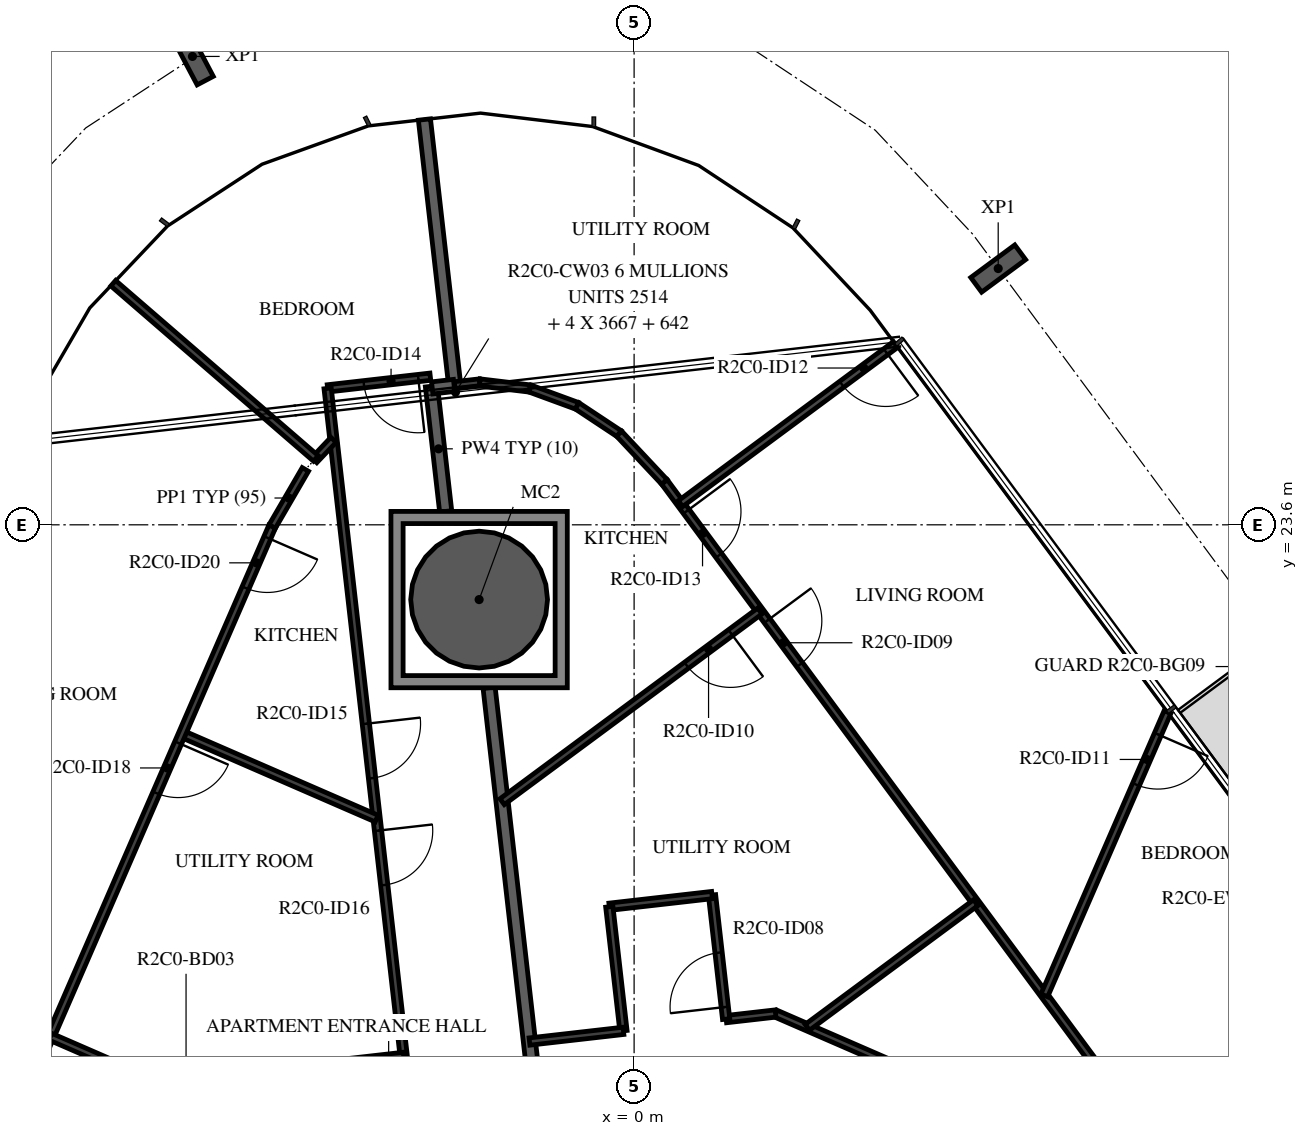
"""IFC4 building model, lengths in metres.
Left out: names, types, materials, properties, quantities, classifications, styles, units other than length and angle.
Written with IfcOpenShell. Run it as: python <this file> out.ifc"""

import sys

from ifc_helpers import new_model, si_unit, direction, frame, frame_2d, origin, origin_2d, place, context, subcontext, project, spatial, polyline, rectangle, hollow_circle, i_section, outline, extrude, element, fill, save


model = new_model("IFC4")
c1 = context("Model", 3, precision=1e-05, world=origin(), true_north=direction((0.0, 1.0)))
c2 = subcontext(c1, "Body", "Model", "MODEL_VIEW")
j1 = project(units=[si_unit("LENGTHUNIT", "METRE"), si_unit("PLANEANGLEUNIT", "RADIAN")], contexts=[c1])
p1 = place(None, origin())
s1 = spatial("IfcSite", under=j1, at=p1, CompositionType="ELEMENT")
p2 = place(p1, origin())
s2 = spatial("IfcBuilding", under=s1, at=p2, CompositionType="ELEMENT")
p3 = place(p2, frame((0.0, 0.0, 97.7)))
s3 = spatial("IfcBuildingStorey", under=s2, at=p3, CompositionType="ELEMENT", Elevation=97.7)
p4 = place(p3, frame((-2.549, 22.37, -0.38), z_axis=(0.0, 0.0, 1.0), x_axis=(1.0, 0.0, 0.0)))
e1 = element("IfcColumn", 1, at=p4, inside=s3, PredefinedType="COLUMN", context=c2, shape_type="SweptSolid", body=[
    extrude(hollow_circle(Radius=1.125, WallThickness=0.055, at=origin_2d()), origin(), (0.0, 0.0, 1.0), 3.5),
])
for number, where, z_axis, x_axis in (
    (2, (5.988, 27.814, -0.38), (0.0, 0.0, 1.0), (0.595, -0.804, 0.0)),
    (3, (-7.263, 31.302, -0.38), (0.0, 0.0, 1.0), (0.884, 0.467, 0.0)),
):
    element("IfcColumn", number, at=place(p3, frame(where, z_axis=z_axis, x_axis=x_axis)), inside=s3, PredefinedType="COLUMN", context=c2, shape_type="SweptSolid", body=[
        extrude(i_section(OverallWidth=0.3, OverallDepth=0.9, WebThickness=0.019, FlangeThickness=0.035, FilletRadius=0.03, at=origin_2d()), origin(), (0.0, 0.0, 1.0), 3.5),
    ])
p5 = place(p3, frame((-2.385, 20.92, 0.0), z_axis=(0.0, 0.0, 1.0), x_axis=(0.113177776247, -0.993574753586, 0.0)))
e4 = element("IfcWall", 4, at=p5, inside=s3, PredefinedType="STANDARD", context=c2, shape_type="SweptSolid", body=[
    extrude(rectangle(XDim=7.356, YDim=0.2, at=frame_2d((3.678, 0.0))), origin(), (0.0, 0.0, 1.0), 3.12),
])
p6 = place(p3, frame((-3.448, 30.265, 0.0), z_axis=(0.0, 0.0, 1.0), x_axis=(0.113189797494, -0.993573384176, 0.0)))
e5 = element("IfcWall", 5, at=p6, inside=s3, PredefinedType="STANDARD", context=c2, shape_type="SweptSolid", body=[
    extrude(rectangle(XDim=4.4, YDim=0.2, at=frame_2d((2.2, 0.0))), origin(), (0.0, 0.0, 1.0), 3.12),
])
p7 = place(p3, frame((-3.333, 25.879, 0.0), z_axis=(0.0, 0.0, 1.0), x_axis=(0.113250782095, -0.993566434797, 0.0)))
e6 = element("IfcWall", 6, at=p7, inside=s3, PredefinedType="STANDARD", context=c2, shape_type="SweptSolid", body=[
    extrude(rectangle(XDim=2.072, YDim=0.2, at=frame_2d((1.036, 0.0))), origin(), (0.0, 0.0, 1.0), 3.12),
])
p8 = place(p3, frame((-2.96, 25.892, 0.0), z_axis=(0.0, 0.0, 1.0), x_axis=(-0.993567388358, -0.113242416041, 0.0)))
e7 = element("IfcWall", 7, at=p8, inside=s3, PredefinedType="STANDARD", context=c2, shape_type="SweptSolid", body=[
    extrude(rectangle(XDim=0.362, YDim=0.2, at=frame_2d((0.181, 0.0))), origin(), (0.0, 0.0, 1.0), 3.12),
])
p9 = place(p3, frame((9.796, 12.315, 0.0), z_axis=(0.0, 0.0, 1.0), x_axis=(-0.917059572812, 0.398750222463, 0.0)))
e8 = element("IfcWall", 8, at=p9, inside=s3, PredefinedType="PARTITIONING", context=c2, shape_type="SweptSolid", body=[
    extrude(rectangle(XDim=8.146, YDim=0.12, at=frame_2d((4.073, 0.0))), origin(), (0.0, 0.0, 1.0), 3.12),
])
p10 = place(p9, frame((2.185, 0.0, 0.0)))
e9 = element("IfcOpeningElement", 9, at=p10, cuts=e8, PredefinedType="OPENING", context=c2, shape_type="SweptSolid", body=[
    extrude(rectangle(XDim=0.8, YDim=2.1, at=frame_2d((0.4, 1.05))), frame((0.0, 0.07, 0.0), z_axis=(0.0, -1.0, 0.0), x_axis=(1.0, 0.0, 0.0)), (0.0, 0.0, 1.0), 0.14),
])
p11 = place(p3, frame((2.326, 15.563, 0.0), z_axis=(0.0, 0.0, 1.0), x_axis=(-0.993570169982, -0.113218007944, 0.0)))
e10 = element("IfcWall", 10, at=p11, inside=s3, PredefinedType="PARTITIONING", context=c2, shape_type="SweptSolid", body=[
    extrude(rectangle(XDim=0.817, YDim=0.12, at=frame_2d((0.409, 0.0))), origin(), (0.0, 0.0, 1.0), 3.12),
])
p12 = place(p3, frame((1.514, 15.471, 0.0), z_axis=(0.0, 0.0, 1.0), x_axis=(-0.113301814952, 0.993560616535, 0.0)))
e11 = element("IfcWall", 11, at=p12, inside=s3, PredefinedType="PARTITIONING", context=c2, shape_type="SweptSolid", body=[
    extrude(rectangle(XDim=2.053, YDim=0.12, at=frame_2d((1.027, 0.0))), origin(), (0.0, 0.0, 1.0), 3.12),
])
p13 = place(p12, frame((0.2, 0.0, 0.0)))
e12 = element("IfcOpeningElement", 12, at=p13, cuts=e11, PredefinedType="OPENING", context=c2, shape_type="SweptSolid", body=[
    extrude(rectangle(XDim=0.9, YDim=2.1, at=frame_2d((0.45, 1.05))), frame((0.0, 0.07, 0.0), z_axis=(0.0, -1.0, 0.0), x_axis=(1.0, 0.0, 0.0)), (0.0, 0.0, 1.0), 0.14),
])
p14 = place(p3, frame((1.281, 17.511, 0.0), z_axis=(0.0, 0.0, 1.0), x_axis=(-0.993575191649, -0.113173930474, 0.0)))
e13 = element("IfcWall", 13, at=p14, inside=s3, PredefinedType="PARTITIONING", context=c2, shape_type="SweptSolid", body=[
    extrude(rectangle(XDim=1.7, YDim=0.12, at=frame_2d((0.85, 0.0))), origin(), (0.0, 0.0, 1.0), 3.12),
])
p15 = place(p3, frame((-0.408, 17.319, 0.0), z_axis=(0.0, 0.0, 1.0), x_axis=(0.113184449176, -0.993573993452, 0.0)))
e14 = element("IfcWall", 14, at=p15, inside=s3, PredefinedType="PARTITIONING", context=c2, shape_type="SweptSolid", body=[
    extrude(rectangle(XDim=2.053, YDim=0.12, at=frame_2d((1.027, 0.0))), origin(), (0.0, 0.0, 1.0), 3.12),
])
p16 = place(p3, frame((-0.175, 15.278, 0.0), z_axis=(0.0, 0.0, 1.0), x_axis=(-0.993575604955, -0.113170301923, 0.0)))
e15 = element("IfcWall", 15, at=p16, inside=s3, PredefinedType="PARTITIONING", context=c2, shape_type="SweptSolid", body=[
    extrude(rectangle(XDim=1.555, YDim=0.12, at=frame_2d((0.778, 0.0))), origin(), (0.0, 0.0, 1.0), 3.12),
])
p17 = place(p3, frame((0.498, 24.306, 0.0), z_axis=(0.0, 0.0, 1.0), x_axis=(0.594826122019, -0.803854392639, 0.0)))
e16 = element("IfcWall", 16, at=p17, inside=s3, PredefinedType="PARTITIONING", context=c2, shape_type="SweptSolid", body=[
    extrude(rectangle(XDim=14.576, YDim=0.12, at=frame_2d((7.288, 0.0))), origin(), (0.0, 0.0, 1.0), 3.12),
])
p18 = place(p17, frame((2.841, 0.0, 0.0)))
e17 = element("IfcOpeningElement", 17, at=p18, cuts=e16, PredefinedType="OPENING", context=c2, shape_type="SweptSolid", body=[
    extrude(rectangle(XDim=0.9, YDim=2.1, at=frame_2d((0.45, 1.05))), frame((0.0, 0.07, 0.0), z_axis=(0.0, -1.0, 0.0), x_axis=(1.0, 0.0, 0.0)), (0.0, 0.0, 1.0), 0.14),
])
p19 = place(p17, frame((0.605, 0.0, 0.0)))
e18 = element("IfcOpeningElement", 18, at=p19, cuts=e16, PredefinedType="OPENING", context=c2, shape_type="SweptSolid", body=[
    extrude(rectangle(XDim=0.9, YDim=2.1, at=frame_2d((0.45, 1.05))), frame((0.0, 0.07, 0.0), z_axis=(0.0, -1.0, 0.0), x_axis=(1.0, 0.0, 0.0)), (0.0, 0.0, 1.0), 0.14),
])
p20 = place(p3, frame((8.772, 20.521, 0.0), z_axis=(0.0, 0.0, 1.0), x_axis=(-0.398733139635, -0.917067000473, 0.0)))
e19 = element("IfcWall", 19, at=p20, inside=s3, PredefinedType="PARTITIONING", context=c2, shape_type="SweptSolid", body=[
    extrude(rectangle(XDim=5.081, YDim=0.12, at=frame_2d((2.541, 0.0))), origin(), (0.0, 0.0, 1.0), 3.12),
])
p21 = place(p20, frame((0.4, 0.0, 0.0)))
e20 = element("IfcOpeningElement", 20, at=p21, cuts=e19, PredefinedType="OPENING", context=c2, shape_type="SweptSolid", body=[
    extrude(rectangle(XDim=0.9, YDim=2.1, at=frame_2d((0.45, 1.05))), frame((0.0, 0.07, 0.0), z_axis=(0.0, -1.0, 0.0), x_axis=(1.0, 0.0, 0.0)), (0.0, 0.0, 1.0), 0.14),
])
p22 = place(p3, frame((5.618, 17.386, 0.0), z_axis=(0.0, 0.0, 1.0), x_axis=(-0.803852063114, -0.59482927015, 0.0)))
e21 = element("IfcWall", 21, at=p22, inside=s3, PredefinedType="PARTITIONING", context=c2, shape_type="SweptSolid", body=[
    extrude(rectangle(XDim=3.446, YDim=0.12, at=frame_2d((1.723, 0.0))), origin(), (0.0, 0.0, 1.0), 3.12),
])
p23 = place(p3, frame((4.299, 26.565, 0.0), z_axis=(0.0, 0.0, 1.0), x_axis=(-0.803851981262, -0.594829380764, 0.0)))
e22 = element("IfcWall", 22, at=p23, inside=s3, PredefinedType="PARTITIONING", context=c2, shape_type="SweptSolid", body=[
    extrude(rectangle(XDim=4.4, YDim=0.12, at=frame_2d((2.2, 0.0))), origin(), (0.0, 0.0, 1.0), 2.73),
])
p24 = place(p23, frame((0.2, 0.0, 0.0)))
e23 = element("IfcOpeningElement", 23, at=p24, cuts=e22, PredefinedType="OPENING", context=c2, shape_type="SweptSolid", body=[
    extrude(rectangle(XDim=0.9, YDim=2.1, at=frame_2d((0.45, 1.05))), frame((0.0, 0.07, 0.0), z_axis=(0.0, -1.0, 0.0), x_axis=(1.0, 0.0, 0.0)), (0.0, 0.0, 1.0), 0.14),
])
p25 = place(p3, frame((2.068, 22.183, 0.0), z_axis=(0.0, 0.0, 1.0), x_axis=(-0.803867138365, -0.594808896921, 0.0)))
e24 = element("IfcWall", 24, at=p25, inside=s3, PredefinedType="PARTITIONING", context=c2, shape_type="SweptSolid", body=[
    extrude(rectangle(XDim=5.273, YDim=0.12, at=frame_2d((2.636, 0.0))), origin(), (0.0, 0.0, 1.0), 3.12),
])
p26 = place(p25, frame((0.6, 0.0, 0.0)))
e25 = element("IfcOpeningElement", 25, at=p26, cuts=e24, PredefinedType="OPENING", context=c2, shape_type="SweptSolid", body=[
    extrude(rectangle(XDim=0.9, YDim=2.1, at=frame_2d((0.45, 1.05))), frame((0.0, 0.07, 0.0), z_axis=(0.0, -1.0, 0.0), x_axis=(1.0, 0.0, 0.0)), (0.0, 0.0, 1.0), 0.14),
])
p27 = place(p3, frame((-2.95, 25.893, 0.0), z_axis=(0.0, 0.0, 1.0), x_axis=(0.993519378224, 0.113662857141, 0.0)))
e26 = element("IfcWall", 26, at=p27, inside=s3, PredefinedType="PARTITIONING", context=c2, shape_type="SweptSolid", body=[
    extrude(rectangle(XDim=0.415, YDim=0.12, at=frame_2d((0.207, 0.0))), origin(), (0.0, 0.0, 1.0), 3.12),
])
for number, where, z_axis, x_axis in (
    (27, (-2.538, 25.94, 0.0), (0.0, 0.0, 1.0), (0.993, -0.119, 0.0)),
    (28, (-1.715, 25.842, 0.0), (0.0, 0.0, 1.0), (0.939, -0.345, 0.0)),
    (29, (-0.937, 25.556, 0.0), (0.0, 0.0, 1.0), (0.834, -0.552, 0.0)),
):
    element("IfcWall", number, at=place(p3, frame(where, z_axis=z_axis, x_axis=x_axis)), inside=s3, PredefinedType="PARTITIONING", context=c2, shape_type="SweptSolid", body=[
        extrude(rectangle(XDim=0.829, YDim=0.12, at=frame_2d((0.415, 0.0))), origin(), (0.0, 0.0, 1.0), 3.12),
    ])
p28 = place(p3, frame((-0.246, 25.098, 0.0), z_axis=(0.0, 0.0, 1.0), x_axis=(0.684172712488, -0.729320025426, 0.0)))
e30 = element("IfcWall", 30, at=p28, inside=s3, PredefinedType="PARTITIONING", context=c2, shape_type="SweptSolid", body=[
    extrude(rectangle(XDim=1.087, YDim=0.12, at=frame_2d((0.543, 0.0))), origin(), (0.0, 0.0, 1.0), 3.12),
])
p29 = place(p3, frame((-3.351, 26.036, 0.0), z_axis=(0.0, 0.0, 1.0), x_axis=(-0.993575191649, -0.113173930474, 0.0)))
e31 = element("IfcWall", 31, at=p29, inside=s3, PredefinedType="PARTITIONING", context=c2, shape_type="SweptSolid", body=[
    extrude(rectangle(XDim=1.7, YDim=0.12, at=frame_2d((0.85, 0.0))), origin(), (0.0, 0.0, 1.0), 3.12),
])
p30 = place(p29, frame((0.2, 0.0, 0.0)))
e32 = element("IfcOpeningElement", 32, at=p30, cuts=e31, PredefinedType="OPENING", context=c2, shape_type="SweptSolid", body=[
    extrude(rectangle(XDim=0.9, YDim=2.1, at=frame_2d((0.45, 1.05))), frame((0.0, 0.07, 0.0), z_axis=(0.0, -1.0, 0.0), x_axis=(1.0, 0.0, 0.0)), (0.0, 0.0, 1.0), 0.14),
])
p31 = place(p3, frame((-5.04, 25.844, 0.0), z_axis=(0.0, 0.0, 1.0), x_axis=(0.1132106553, -0.993571007793, 0.0)))
e33 = element("IfcWall", 33, at=p31, inside=s3, PredefinedType="PARTITIONING", context=c2, shape_type="SweptSolid", body=[
    extrude(rectangle(XDim=11.048, YDim=0.12, at=frame_2d((5.524, 0.0))), origin(), (0.0, 0.0, 1.0), 3.12),
])
p32 = place(p31, frame((5.551, 0.0, 0.0)))
e34 = element("IfcOpeningElement", 34, at=p32, cuts=e33, PredefinedType="OPENING", context=c2, shape_type="SweptSolid", body=[
    extrude(rectangle(XDim=0.9, YDim=2.1, at=frame_2d((0.45, 1.05))), frame((0.0, 0.07, 0.0), z_axis=(0.0, -1.0, 0.0), x_axis=(1.0, 0.0, 0.0)), (0.0, 0.0, 1.0), 0.14),
])
p33 = place(p31, frame((7.32, 0.0, 0.0)))
e35 = element("IfcOpeningElement", 35, at=p33, cuts=e33, PredefinedType="OPENING", context=c2, shape_type="SweptSolid", body=[
    extrude(rectangle(XDim=0.9, YDim=2.1, at=frame_2d((0.45, 1.05))), frame((0.0, 0.07, 0.0), z_axis=(0.0, -1.0, 0.0), x_axis=(1.0, 0.0, 0.0)), (0.0, 0.0, 1.0), 0.14),
])
p34 = place(p3, frame((-3.79, 14.867, 0.0), z_axis=(0.0, 0.0, 1.0), x_axis=(-0.993557948123, -0.113325212204, 0.0)))
e36 = element("IfcWall", 36, at=p34, inside=s3, PredefinedType="PARTITIONING", context=c2, shape_type="SweptSolid", body=[
    extrude(rectangle(XDim=1.991, YDim=0.12, at=frame_2d((0.995, 0.0))), origin(), (0.0, 0.0, 1.0), 3.12),
])
p35 = place(p3, frame((-5.261, 24.663, 0.0), z_axis=(0.0, 0.0, 1.0), x_axis=(0.688346106747, 0.725382407648, 0.0)))
e37 = element("IfcWall", 37, at=p35, inside=s3, PredefinedType="PARTITIONING", context=c2, shape_type="SweptSolid", body=[
    extrude(rectangle(XDim=0.461, YDim=0.12, at=frame_2d((0.231, 0.0))), origin(), (0.0, 0.0, 1.0), 3.12),
])
p36 = place(p3, frame((-8.566, 27.573, 0.0), z_axis=(0.0, 0.0, 1.0), x_axis=(0.756463964606, -0.654035373854, 0.0)))
e38 = element("IfcWall", 38, at=p36, inside=s3, PredefinedType="PARTITIONING", context=c2, shape_type="SweptSolid", body=[
    extrude(rectangle(XDim=4.405, YDim=0.12, at=frame_2d((2.202, 0.0))), origin(), (0.0, 0.0, 1.0), 3.12),
])
p37 = place(p3, frame((-7.435, 20.161, 0.0), z_axis=(0.0, 0.0, 1.0), x_axis=(0.917055599503, -0.398759360291, 0.0)))
e39 = element("IfcWall", 39, at=p37, inside=s3, PredefinedType="PARTITIONING", context=c2, shape_type="SweptSolid", body=[
    extrude(rectangle(XDim=3.49, YDim=0.12, at=frame_2d((1.745, 0.0))), origin(), (0.0, 0.0, 1.0), 3.12),
])
p38 = place(p3, frame((-5.406, 24.51, 0.0), z_axis=(0.0, 0.0, 1.0), x_axis=(-0.502487709822, -0.864584351858, 0.0)))
e40 = element("IfcWall", 40, at=p38, inside=s3, PredefinedType="PARTITIONING", context=c2, shape_type="SweptSolid", body=[
    extrude(rectangle(XDim=1.087, YDim=0.12, at=frame_2d((0.543, 0.0))), origin(), (0.0, 0.0, 1.0), 3.12),
])
p39 = place(p3, frame((-5.952, 23.571, 0.0), z_axis=(0.0, 0.0, 1.0), x_axis=(-0.398745097158, -0.917061801348, 0.0)))
e41 = element("IfcWall", 41, at=p39, inside=s3, PredefinedType="PARTITIONING", context=c2, shape_type="SweptSolid", body=[
    extrude(rectangle(XDim=14.576, YDim=0.12, at=frame_2d((7.288, 0.0))), origin(), (0.0, 0.0, 1.0), 3.12),
])
p40 = place(p39, frame((3.878, 0.0, 0.0)))
e42 = element("IfcOpeningElement", 42, at=p40, cuts=e41, PredefinedType="OPENING", context=c2, shape_type="SweptSolid", body=[
    extrude(rectangle(XDim=0.9, YDim=2.1, at=frame_2d((0.45, 1.05))), frame((0.0, 0.07, 0.0), z_axis=(0.0, -1.0, 0.0), x_axis=(1.0, 0.0, 0.0)), (0.0, 0.0, 1.0), 0.14),
])
p41 = place(p39, frame((0.2, 0.0, 0.0)))
e43 = element("IfcOpeningElement", 43, at=p41, cuts=e41, PredefinedType="OPENING", context=c2, shape_type="SweptSolid", body=[
    extrude(rectangle(XDim=0.9, YDim=2.1, at=frame_2d((0.45, 1.05))), frame((0.0, 0.07, 0.0), z_axis=(0.0, -1.0, 0.0), x_axis=(1.0, 0.0, 0.0)), (0.0, 0.0, 1.0), 0.14),
])
p42 = place(p3, frame((-9.6, 15.182, 0.0), z_axis=(0.0, 0.0, 1.0), x_axis=(0.917073771145, -0.398717567054, 0.0)))
e44 = element("IfcWall", 44, at=p42, inside=s3, PredefinedType="PARTITIONING", context=c2, shape_type="SweptSolid", body=[
    extrude(rectangle(XDim=3.135, YDim=0.12, at=frame_2d((1.567, 0.0))), origin(), (0.0, 0.0, 1.0), 3.12),
])
p43 = place(p3, origin())
e45 = element("IfcWall", 45, at=p43, inside=s3, PredefinedType="STANDARD", context=c2, shape_type="SweptSolid", body=[
    extrude(outline(polyline([(-1.099, 23.82), (-1.099, 20.92), (-3.999, 20.92), (-3.999, 23.82), (-1.099, 23.82)]), holes=[polyline([(-3.799, 21.12), (-1.299, 21.12), (-1.299, 23.62), (-3.799, 23.62), (-3.799, 21.12)])]), origin(), (0.0, 0.0, 1.0), 3.12),
])
p44 = place(p13, origin())
e46 = element("IfcDoor", 46, at=p44, inside=s3, OperationType="SINGLE_SWING_RIGHT", PredefinedType="DOOR", context=c2, shape_type="SweptSolid", body=[
    extrude(rectangle(XDim=0.9, YDim=2.1, at=frame_2d((0.45, 1.05))), frame((0.0, 0.025, 0.0), z_axis=(0.0, -1.0, 0.0), x_axis=(1.0, 0.0, 0.0)), (0.0, 0.0, 1.0), 0.05),
])
fill(e12, e46)
p45 = place(p18, origin())
e47 = element("IfcDoor", 47, at=p45, inside=s3, OperationType="SINGLE_SWING_RIGHT", PredefinedType="DOOR", context=c2, shape_type="SweptSolid", body=[
    extrude(rectangle(XDim=0.9, YDim=2.1, at=frame_2d((0.45, 1.05))), frame((0.0, 0.025, 0.0), z_axis=(0.0, -1.0, 0.0), x_axis=(1.0, 0.0, 0.0)), (0.0, 0.0, 1.0), 0.05),
])
fill(e17, e47)
p46 = place(p26, origin())
e48 = element("IfcDoor", 48, at=p46, inside=s3, OperationType="SINGLE_SWING_RIGHT", PredefinedType="DOOR", context=c2, shape_type="SweptSolid", body=[
    extrude(rectangle(XDim=0.9, YDim=2.1, at=frame_2d((0.45, 1.05))), frame((0.0, 0.025, 0.0), z_axis=(0.0, -1.0, 0.0), x_axis=(1.0, 0.0, 0.0)), (0.0, 0.0, 1.0), 0.05),
])
fill(e25, e48)
p47 = place(p21, origin())
e49 = element("IfcDoor", 49, at=p47, inside=s3, OperationType="SINGLE_SWING_LEFT", PredefinedType="DOOR", context=c2, shape_type="SweptSolid", body=[
    extrude(rectangle(XDim=0.9, YDim=2.1, at=frame_2d((0.45, 1.05))), frame((0.0, 0.025, 0.0), z_axis=(0.0, -1.0, 0.0), x_axis=(1.0, 0.0, 0.0)), (0.0, 0.0, 1.0), 0.05),
])
fill(e20, e49)
p48 = place(p24, origin())
e50 = element("IfcDoor", 50, at=p48, inside=s3, OperationType="SINGLE_SWING_RIGHT", PredefinedType="DOOR", context=c2, shape_type="SweptSolid", body=[
    extrude(rectangle(XDim=0.9, YDim=2.1, at=frame_2d((0.45, 1.05))), frame((0.0, 0.025, 0.0), z_axis=(0.0, -1.0, 0.0), x_axis=(1.0, 0.0, 0.0)), (0.0, 0.0, 1.0), 0.05),
])
fill(e23, e50)
p49 = place(p19, origin())
e51 = element("IfcDoor", 51, at=p49, inside=s3, OperationType="SINGLE_SWING_LEFT", PredefinedType="DOOR", context=c2, shape_type="SweptSolid", body=[
    extrude(rectangle(XDim=0.9, YDim=2.1, at=frame_2d((0.45, 1.05))), frame((0.0, 0.025, 0.0), z_axis=(0.0, -1.0, 0.0), x_axis=(1.0, 0.0, 0.0)), (0.0, 0.0, 1.0), 0.05),
])
fill(e18, e51)
p50 = place(p30, origin())
e52 = element("IfcDoor", 52, at=p50, inside=s3, OperationType="SINGLE_SWING_RIGHT", PredefinedType="DOOR", context=c2, shape_type="SweptSolid", body=[
    extrude(rectangle(XDim=0.9, YDim=2.1, at=frame_2d((0.45, 1.05))), frame((0.0, 0.025, 0.0), z_axis=(0.0, -1.0, 0.0), x_axis=(1.0, 0.0, 0.0)), (0.0, 0.0, 1.0), 0.05),
])
fill(e32, e52)
p51 = place(p32, origin())
e53 = element("IfcDoor", 53, at=p51, inside=s3, OperationType="SINGLE_SWING_LEFT", PredefinedType="DOOR", context=c2, shape_type="SweptSolid", body=[
    extrude(rectangle(XDim=0.9, YDim=2.1, at=frame_2d((0.45, 1.05))), frame((0.0, 0.025, 0.0), z_axis=(0.0, -1.0, 0.0), x_axis=(1.0, 0.0, 0.0)), (0.0, 0.0, 1.0), 0.05),
])
fill(e34, e53)
p52 = place(p33, origin())
e54 = element("IfcDoor", 54, at=p52, inside=s3, OperationType="SINGLE_SWING_LEFT", PredefinedType="DOOR", context=c2, shape_type="SweptSolid", body=[
    extrude(rectangle(XDim=0.9, YDim=2.1, at=frame_2d((0.45, 1.05))), frame((0.0, 0.025, 0.0), z_axis=(0.0, -1.0, 0.0), x_axis=(1.0, 0.0, 0.0)), (0.0, 0.0, 1.0), 0.05),
])
fill(e35, e54)
p53 = place(p40, origin())
e55 = element("IfcDoor", 55, at=p53, inside=s3, OperationType="SINGLE_SWING_LEFT", PredefinedType="DOOR", context=c2, shape_type="SweptSolid", body=[
    extrude(rectangle(XDim=0.9, YDim=2.1, at=frame_2d((0.45, 1.05))), frame((0.0, 0.025, 0.0), z_axis=(0.0, -1.0, 0.0), x_axis=(1.0, 0.0, 0.0)), (0.0, 0.0, 1.0), 0.05),
])
fill(e42, e55)
p54 = place(p41, origin())
e56 = element("IfcDoor", 56, at=p54, inside=s3, OperationType="SINGLE_SWING_RIGHT", PredefinedType="DOOR", context=c2, shape_type="SweptSolid", body=[
    extrude(rectangle(XDim=0.9, YDim=2.1, at=frame_2d((0.45, 1.05))), frame((0.0, 0.025, 0.0), z_axis=(0.0, -1.0, 0.0), x_axis=(1.0, 0.0, 0.0)), (0.0, 0.0, 1.0), 0.05),
])
fill(e43, e56)
save(model, sys.argv[1])
